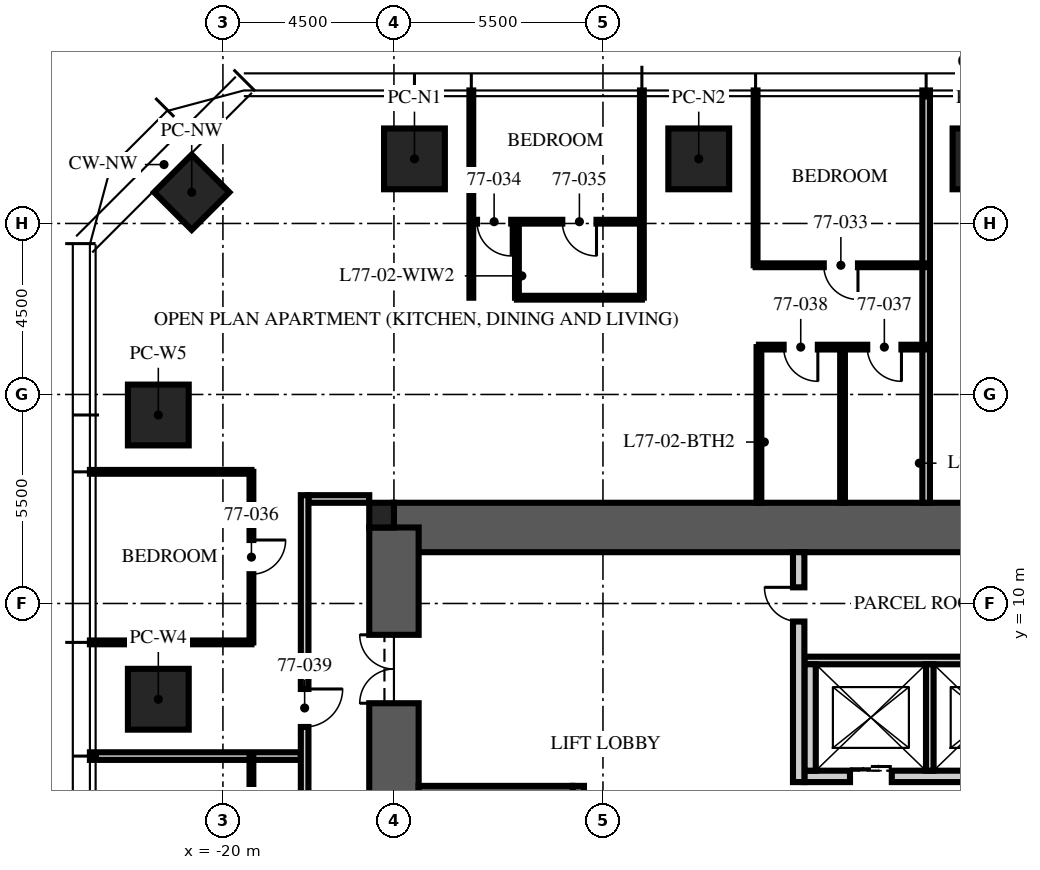
"""IFC4 building model, lengths in metres.
Left out: names, types, materials, properties, quantities, classifications, styles, units other than length and angle.
Written with IfcOpenShell. Run it as: python <this file> out.ifc"""

import sys

from ifc_helpers import new_model, si_unit, direction, frame, frame_2d, origin, origin_2d, place, context, subcontext, project, spatial, rectangle, extrude, element, fill, save


model = new_model("IFC4")
c1 = context("Model", 3, precision=1e-05, world=origin(), true_north=direction((0.0, 1.0)))
c2 = subcontext(c1, "Body", "Model", "MODEL_VIEW")
j1 = project(units=[si_unit("LENGTHUNIT", "METRE"), si_unit("PLANEANGLEUNIT", "RADIAN")], contexts=[c1])
p1 = place(None, origin())
s1 = spatial("IfcSite", under=j1, at=p1, CompositionType="ELEMENT")
p2 = place(p1, origin())
s2 = spatial("IfcBuilding", under=s1, at=p2, CompositionType="ELEMENT")
p3 = place(p2, frame((0.0, 0.0, 308.25)))
s3 = spatial("IfcBuildingStorey", under=s2, at=p3, CompositionType="ELEMENT", Elevation=308.25)
p4 = place(p3, frame((-15.5, 12.0, -0.25), z_axis=(0.0, 0.0, 1.0), x_axis=(1.0, 0.0, 0.0)))
e1 = element("IfcWall", 1, at=p4, inside=s3, PredefinedType="SHEAR", context=c2, shape_type="SweptSolid", body=[
    extrude(rectangle(XDim=31.0, YDim=1.3, at=frame_2d((15.5, 0.0))), origin(), (0.0, 0.0, 1.0), 3.75),
])
p5 = place(p3, frame((-15.5, -12.0, -0.25), z_axis=(0.0, 0.0, 1.0), x_axis=(0.0, 1.0, 0.0)))
e2 = element("IfcWall", 2, at=p5, inside=s3, PredefinedType="SHEAR", context=c2, shape_type="SweptSolid", body=[
    extrude(rectangle(XDim=24.0, YDim=1.3, at=frame_2d((12.0, 0.0))), origin(), (0.0, 0.0, 1.0), 3.75),
])
p6 = place(p5, frame((3.125, 0.0, 0.25)))
e3 = element("IfcOpeningElement", 3, at=p6, cuts=e2, PredefinedType="OPENING", context=c2, shape_type="SweptSolid", body=[
    extrude(rectangle(XDim=1.2, YDim=2.1, at=frame_2d((0.6, 1.05))), frame((0.0, 0.66, 0.0), z_axis=(0.0, -1.0, 0.0), x_axis=(1.0, 0.0, 0.0)), (0.0, 0.0, 1.0), 1.32),
])
p7 = place(p5, frame((19.375, 0.0, 0.25)))
e4 = element("IfcOpeningElement", 4, at=p7, cuts=e2, PredefinedType="OPENING", context=c2, shape_type="SweptSolid", body=[
    extrude(rectangle(XDim=1.8, YDim=2.1, at=frame_2d((0.9, 1.05))), frame((0.0, 0.66, 0.0), z_axis=(0.0, -1.0, 0.0), x_axis=(1.0, 0.0, 0.0)), (0.0, 0.0, 1.0), 1.32),
])
p8 = place(p3, frame((-15.825, 12.325, -0.25), z_axis=(0.0, 0.0, 1.0), x_axis=(1.0, 0.0, 0.0)))
e5 = element("IfcColumn", 5, at=p8, inside=s3, PredefinedType="COLUMN", context=c2, shape_type="SweptSolid", body=[
    extrude(rectangle(XDim=0.65, YDim=0.65, at=origin_2d()), origin(), (0.0, 0.0, 1.0), 3.75),
])
for number, where, z_axis, x_axis in (
    (6, (-14.96, 21.7, 0.0), (0.0, 0.0, 1.0), (1.0, 0.0, 0.0)),
    (7, (-7.48, 21.7, 0.0), (0.0, 0.0, 1.0), (1.0, 0.0, 0.0)),
    (8, (0.0, 21.7, 0.0), (0.0, 0.0, 1.0), (1.0, 0.0, 0.0)),
    (9, (-21.7, 7.48, 0.0), (0.0, 0.0, 1.0), (0.0, 1.0, 0.0)),
    (10, (-21.7, 14.96, 0.0), (0.0, 0.0, 1.0), (0.0, 1.0, 0.0)),
):
    element("IfcColumn", number, at=place(p3, frame(where, z_axis=z_axis, x_axis=x_axis)), inside=s3, PredefinedType="COLUMN", context=c2, shape_type="SweptSolid", body=[
        extrude(rectangle(XDim=1.6, YDim=1.6, at=origin_2d()), origin(), (0.0, 0.0, 1.0), 3.75),
    ])
p9 = place(p3, frame((-20.821, 20.821, 0.0), z_axis=(0.0, 0.0, 1.0), x_axis=(0.707106781187, 0.707106781187, 0.0)))
e11 = element("IfcColumn", 11, at=p9, inside=s3, PredefinedType="COLUMN", context=c2, shape_type="SweptSolid", body=[
    extrude(rectangle(XDim=1.4, YDim=1.4, at=origin_2d()), origin(), (0.0, 0.0, 1.0), 3.75),
])
p10 = place(p3, frame((-10.65, -4.9, 0.0), z_axis=(0.0, 0.0, 1.0), x_axis=(0.0, 1.0, 0.0)))
e12 = element("IfcWall", 12, at=p10, inside=s3, PredefinedType="SOLIDWALL", context=c2, shape_type="SweptSolid", body=[
    extrude(rectangle(XDim=10.1, YDim=0.3, at=frame_2d((5.05, 0.0))), origin(), (0.0, 0.0, 1.0), 3.5),
])
p11 = place(p3, frame((-14.85, 5.05, 0.0), z_axis=(0.0, 0.0, 1.0), x_axis=(1.0, 0.0, 0.0)))
e13 = element("IfcWall", 13, at=p11, inside=s3, PredefinedType="SOLIDWALL", context=c2, shape_type="SweptSolid", body=[
    extrude(rectangle(XDim=4.05, YDim=0.3, at=frame_2d((2.025, 0.0))), origin(), (0.0, 0.0, 1.0), 3.5),
])
p12 = place(p3, frame((-4.7, 5.45, 0.0), z_axis=(0.0, 0.0, 1.0), x_axis=(1.0, 0.0, 0.0)))
e14 = element("IfcWall", 14, at=p12, inside=s3, PredefinedType="PARTITIONING", context=c2, shape_type="SweptSolid", body=[
    extrude(rectangle(XDim=9.7, YDim=0.3, at=frame_2d((4.85, 0.0))), origin(), (0.0, 0.0, 1.0), 3.5),
])
p13 = place(p12, frame((1.2, 0.0, 0.0)))
e15 = element("IfcOpeningElement", 15, at=p13, cuts=e14, PredefinedType="OPENING", context=c2, shape_type="SweptSolid", body=[
    extrude(rectangle(XDim=1.1, YDim=2.1, at=frame_2d((0.55, 1.05))), frame((0.0, 0.16, 0.0), z_axis=(0.0, -1.0, 0.0), x_axis=(1.0, 0.0, 0.0)), (0.0, 0.0, 1.0), 0.32),
])
p14 = place(p12, frame((4.3, 0.0, 0.0)))
e16 = element("IfcOpeningElement", 16, at=p14, cuts=e14, PredefinedType="OPENING", context=c2, shape_type="SweptSolid", body=[
    extrude(rectangle(XDim=1.1, YDim=2.1, at=frame_2d((0.55, 1.05))), frame((0.0, 0.16, 0.0), z_axis=(0.0, -1.0, 0.0), x_axis=(1.0, 0.0, 0.0)), (0.0, 0.0, 1.0), 0.32),
])
p15 = place(p12, frame((7.4, 0.0, 0.0)))
e17 = element("IfcOpeningElement", 17, at=p15, cuts=e14, PredefinedType="OPENING", context=c2, shape_type="SweptSolid", body=[
    extrude(rectangle(XDim=1.1, YDim=2.1, at=frame_2d((0.55, 1.05))), frame((0.0, 0.16, 0.0), z_axis=(0.0, -1.0, 0.0), x_axis=(1.0, 0.0, 0.0)), (0.0, 0.0, 1.0), 0.32),
])
p16 = place(p3, frame((-4.7, 8.5, 0.0), z_axis=(0.0, 0.0, 1.0), x_axis=(1.0, 0.0, 0.0)))
e18 = element("IfcWall", 18, at=p16, inside=s3, PredefinedType="PARTITIONING", context=c2, shape_type="SweptSolid", body=[
    extrude(rectangle(XDim=9.7, YDim=0.2, at=frame_2d((4.85, 0.0))), origin(), (0.0, 0.0, 1.0), 3.5),
])
p17 = place(p3, frame((-4.55, 5.6, 0.0), z_axis=(0.0, 0.0, 1.0), x_axis=(0.0, 1.0, 0.0)))
e19 = element("IfcWall", 19, at=p17, inside=s3, PredefinedType="PARTITIONING", context=c2, shape_type="SweptSolid", body=[
    extrude(rectangle(XDim=2.8, YDim=0.3, at=frame_2d((1.4, 0.0))), origin(), (0.0, 0.0, 1.0), 3.5),
])
p18 = place(p3, frame((-1.4, 5.6, 0.0), z_axis=(0.0, 0.0, 1.0), x_axis=(0.0, 1.0, 0.0)))
e20 = element("IfcWall", 20, at=p18, inside=s3, PredefinedType="PARTITIONING", context=c2, shape_type="SweptSolid", body=[
    extrude(rectangle(XDim=2.8, YDim=0.2, at=frame_2d((1.4, 0.0))), origin(), (0.0, 0.0, 1.0), 3.5),
])
p19 = place(p3, frame((-4.85, 5.3, 0.0), z_axis=(0.0, 0.0, 1.0), x_axis=(0.0, 1.0, 0.0)))
e21 = element("IfcWall", 21, at=p19, inside=s3, PredefinedType="PARTITIONING", context=c2, shape_type="SweptSolid", body=[
    extrude(rectangle(XDim=6.05, YDim=0.3, at=frame_2d((3.025, 0.0))), origin(), (0.0, 0.0, 1.0), 3.5),
])
p20 = place(p19, frame((4.225, 0.0, 0.0)))
e22 = element("IfcOpeningElement", 22, at=p20, cuts=e21, PredefinedType="OPENING", context=c2, shape_type="SweptSolid", body=[
    extrude(rectangle(XDim=0.9, YDim=2.1, at=frame_2d((0.45, 1.05))), frame((0.0, 0.16, 0.0), z_axis=(0.0, -1.0, 0.0), x_axis=(1.0, 0.0, 0.0)), (0.0, 0.0, 1.0), 0.32),
])
p21 = place(p3, frame((-16.15, 12.75, 0.0), z_axis=(0.0, 0.0, 1.0), x_axis=(-1.0, 0.0, 0.0)))
e23 = element("IfcWall", 23, at=p21, inside=s3, PredefinedType="PARTITIONING", context=c2, shape_type="SweptSolid", body=[
    extrude(rectangle(XDim=1.6, YDim=0.2, at=frame_2d((0.8, 0.0))), origin(), (0.0, 0.0, 1.0), 2.6),
])
p22 = place(p3, frame((-1.496, 12.65, 0.0), z_axis=(0.0, 0.0, 1.0), x_axis=(0.0, 1.0, 0.0)))
e24 = element("IfcWall", 24, at=p22, inside=s3, PredefinedType="PARTITIONING", context=c2, shape_type="SweptSolid", body=[
    extrude(rectangle(XDim=10.85, YDim=0.2, at=frame_2d((5.425, 0.0))), origin(), (0.0, 0.0, 1.0), 3.01),
])
p23 = place(p3, frame((-5.984, 18.9, 0.0), z_axis=(0.0, 0.0, 1.0), x_axis=(0.0, 1.0, 0.0)))
e25 = element("IfcWall", 25, at=p23, inside=s3, PredefinedType="PARTITIONING", context=c2, shape_type="SweptSolid", body=[
    extrude(rectangle(XDim=4.6, YDim=0.1, at=frame_2d((2.3, 0.0))), origin(), (0.0, 0.0, 1.0), 3.01),
])
for number, where, z_axis, x_axis in (
    (26, (-8.976, 18.046, 0.0), (0.0, 0.0, 1.0), (0.0, 1.0, 0.0)),
    (27, (-13.464, 18.046, 0.0), (0.0, 0.0, 1.0), (0.0, 1.0, 0.0)),
):
    element("IfcWall", number, at=place(p3, frame(where, z_axis=z_axis, x_axis=x_axis)), inside=s3, PredefinedType="PARTITIONING", context=c2, shape_type="SweptSolid", body=[
        extrude(rectangle(XDim=5.454, YDim=0.1, at=frame_2d((2.727, 0.0))), origin(), (0.0, 0.0, 1.0), 3.01),
    ])
for number, where, z_axis, x_axis in (
    (28, (-19.25, 13.464, 0.0), (0.0, 0.0, 1.0), (-1.0, 0.0, 0.0)),
    (29, (-19.25, 8.976, 0.0), (0.0, 0.0, 1.0), (-1.0, 0.0, 0.0)),
):
    element("IfcWall", number, at=place(p3, frame(where, z_axis=z_axis, x_axis=x_axis)), inside=s3, PredefinedType="PARTITIONING", context=c2, shape_type="SweptSolid", body=[
        extrude(rectangle(XDim=4.25, YDim=0.1, at=frame_2d((2.125, 0.0))), origin(), (0.0, 0.0, 1.0), 3.01),
    ])
p24 = place(p3, frame((-17.95, 5.984, 0.0), z_axis=(0.0, 0.0, 1.0), x_axis=(-1.0, 0.0, 0.0)))
e30 = element("IfcWall", 30, at=p24, inside=s3, PredefinedType="PARTITIONING", context=c2, shape_type="SweptSolid", body=[
    extrude(rectangle(XDim=5.55, YDim=0.2, at=frame_2d((2.775, 0.0))), origin(), (0.0, 0.0, 1.0), 3.01),
])
p25 = place(p3, frame((-1.496, 18.9, 0.0), z_axis=(0.0, 0.0, 1.0), x_axis=(-1.0, 0.0, 0.0)))
e31 = element("IfcWall", 31, at=p25, inside=s3, PredefinedType="PARTITIONING", context=c2, shape_type="SweptSolid", body=[
    extrude(rectangle(XDim=4.488, YDim=0.1, at=frame_2d((2.244, 0.0))), origin(), (0.0, 0.0, 1.0), 2.91),
])
p26 = place(p25, frame((1.794, 0.0, 0.0)))
e32 = element("IfcOpeningElement", 32, at=p26, cuts=e31, PredefinedType="OPENING", context=c2, shape_type="SweptSolid", body=[
    extrude(rectangle(XDim=0.9, YDim=2.1, at=frame_2d((0.45, 1.05))), frame((0.0, 0.06, 0.0), z_axis=(0.0, -1.0, 0.0), x_axis=(1.0, 0.0, 0.0)), (0.0, 0.0, 1.0), 0.12),
])
p27 = place(p3, frame((-8.976, 20.046, 0.0), z_axis=(0.0, 0.0, 1.0), x_axis=(-1.0, 0.0, 0.0)))
e33 = element("IfcWall", 33, at=p27, inside=s3, PredefinedType="PARTITIONING", context=c2, shape_type="SweptSolid", body=[
    extrude(rectangle(XDim=4.488, YDim=0.1, at=frame_2d((2.244, 0.0))), origin(), (0.0, 0.0, 1.0), 2.91),
])
p28 = place(p27, frame((3.438, 0.0, 0.0)))
e34 = element("IfcOpeningElement", 34, at=p28, cuts=e33, PredefinedType="OPENING", context=c2, shape_type="SweptSolid", body=[
    extrude(rectangle(XDim=0.9, YDim=2.1, at=frame_2d((0.45, 1.05))), frame((0.0, 0.06, 0.0), z_axis=(0.0, -1.0, 0.0), x_axis=(1.0, 0.0, 0.0)), (0.0, 0.0, 1.0), 0.12),
])
p29 = place(p27, frame((1.194, 0.0, 0.0)))
e35 = element("IfcOpeningElement", 35, at=p29, cuts=e33, PredefinedType="OPENING", context=c2, shape_type="SweptSolid", body=[
    extrude(rectangle(XDim=0.9, YDim=2.1, at=frame_2d((0.45, 1.05))), frame((0.0, 0.06, 0.0), z_axis=(0.0, -1.0, 0.0), x_axis=(1.0, 0.0, 0.0)), (0.0, 0.0, 1.0), 0.12),
])
p30 = place(p3, frame((-12.264, 18.046, 0.0), z_axis=(0.0, 0.0, 1.0), x_axis=(0.0, 1.0, 0.0)))
e36 = element("IfcWall", 36, at=p30, inside=s3, PredefinedType="PARTITIONING", context=c2, shape_type="SweptSolid", body=[
    extrude(rectangle(XDim=2.0, YDim=0.1, at=frame_2d((1.0, 0.0))), origin(), (0.0, 0.0, 1.0), 3.5),
])
p31 = place(p3, frame((-8.976, 18.046, 0.0), z_axis=(0.0, 0.0, 1.0), x_axis=(-1.0, 0.0, 0.0)))
e37 = element("IfcWall", 37, at=p31, inside=s3, PredefinedType="PARTITIONING", context=c2, shape_type="SweptSolid", body=[
    extrude(rectangle(XDim=3.288, YDim=0.1, at=frame_2d((1.644, 0.0))), origin(), (0.0, 0.0, 1.0), 2.91),
])
p32 = place(p3, frame((-19.25, 13.464, 0.0), z_axis=(0.0, 0.0, 1.0), x_axis=(0.0, -1.0, 0.0)))
e38 = element("IfcWall", 38, at=p32, inside=s3, PredefinedType="PARTITIONING", context=c2, shape_type="SweptSolid", body=[
    extrude(rectangle(XDim=4.488, YDim=0.1, at=frame_2d((2.244, 0.0))), origin(), (0.0, 0.0, 1.0), 2.91),
])
p33 = place(p32, frame((1.794, 0.0, 0.0)))
e39 = element("IfcOpeningElement", 39, at=p33, cuts=e38, PredefinedType="OPENING", context=c2, shape_type="SweptSolid", body=[
    extrude(rectangle(XDim=0.9, YDim=2.1, at=frame_2d((0.45, 1.05))), frame((0.0, 0.06, 0.0), z_axis=(0.0, -1.0, 0.0), x_axis=(1.0, 0.0, 0.0)), (0.0, 0.0, 1.0), 0.12),
])
p34 = place(p3, frame((-1.496, 16.746, 0.0), z_axis=(0.0, 0.0, 1.0), x_axis=(-1.0, 0.0, 0.0)))
e40 = element("IfcWall", 40, at=p34, inside=s3, PredefinedType="PARTITIONING", context=c2, shape_type="SweptSolid", body=[
    extrude(rectangle(XDim=4.4, YDim=0.125, at=frame_2d((2.2, 0.0))), origin(), (0.0, 0.0, 1.0), 2.91),
])
p35 = place(p34, frame((0.65, 0.0, 0.0)))
e41 = element("IfcOpeningElement", 41, at=p35, cuts=e40, PredefinedType="OPENING", context=c2, shape_type="SweptSolid", body=[
    extrude(rectangle(XDim=0.9, YDim=2.1, at=frame_2d((0.45, 1.05))), frame((0.0, 0.073, 0.0), z_axis=(0.0, -1.0, 0.0), x_axis=(1.0, 0.0, 0.0)), (0.0, 0.0, 1.0), 0.145),
])
p36 = place(p34, frame((2.85, 0.0, 0.0)))
e42 = element("IfcOpeningElement", 42, at=p36, cuts=e40, PredefinedType="OPENING", context=c2, shape_type="SweptSolid", body=[
    extrude(rectangle(XDim=0.9, YDim=2.1, at=frame_2d((0.45, 1.05))), frame((0.0, 0.073, 0.0), z_axis=(0.0, -1.0, 0.0), x_axis=(1.0, 0.0, 0.0)), (0.0, 0.0, 1.0), 0.145),
])
p37 = place(p3, frame((-3.696, 12.65, 0.0), z_axis=(0.0, 0.0, 1.0), x_axis=(0.0, 1.0, 0.0)))
e43 = element("IfcWall", 43, at=p37, inside=s3, PredefinedType="PARTITIONING", context=c2, shape_type="SweptSolid", body=[
    extrude(rectangle(XDim=4.096, YDim=0.125, at=frame_2d((2.048, 0.0))), origin(), (0.0, 0.0, 1.0), 2.91),
])
p38 = place(p3, frame((-5.896, 12.65, 0.0), z_axis=(0.0, 0.0, 1.0), x_axis=(0.0, 1.0, 0.0)))
e44 = element("IfcWall", 44, at=p38, inside=s3, PredefinedType="PARTITIONING", context=c2, shape_type="SweptSolid", body=[
    extrude(rectangle(XDim=4.096, YDim=0.125, at=frame_2d((2.048, 0.0))), origin(), (0.0, 0.0, 1.0), 3.5),
])
p39 = place(p3, frame((-19.25, 5.984, 0.0), z_axis=(0.0, 0.0, 1.0), x_axis=(0.0, -1.0, 0.0)))
e45 = element("IfcWall", 45, at=p39, inside=s3, PredefinedType="PARTITIONING", context=c2, shape_type="SweptSolid", body=[
    extrude(rectangle(XDim=4.488, YDim=0.1, at=frame_2d((2.244, 0.0))), origin(), (0.0, 0.0, 1.0), 2.91),
])
p40 = place(p39, frame((1.794, 0.0, 0.0)))
e46 = element("IfcOpeningElement", 46, at=p40, cuts=e45, PredefinedType="OPENING", context=c2, shape_type="SweptSolid", body=[
    extrude(rectangle(XDim=0.9, YDim=2.1, at=frame_2d((0.45, 1.05))), frame((0.0, 0.06, 0.0), z_axis=(0.0, -1.0, 0.0), x_axis=(1.0, 0.0, 0.0)), (0.0, 0.0, 1.0), 0.12),
])
p41 = place(p3, frame((-17.85, 12.85, 0.0), z_axis=(0.0, 0.0, 1.0), x_axis=(0.0, -1.0, 0.0)))
e47 = element("IfcWall", 47, at=p41, inside=s3, PredefinedType="PARTITIONING", context=c2, shape_type="SweptSolid", body=[
    extrude(rectangle(XDim=25.5, YDim=0.2, at=frame_2d((12.75, 0.0))), origin(), (0.0, 0.0, 1.0), 2.9),
])
p42 = place(p41, frame((5.1, 0.0, 0.0)))
e48 = element("IfcOpeningElement", 48, at=p42, cuts=e47, PredefinedType="OPENING", context=c2, shape_type="SweptSolid", body=[
    extrude(rectangle(XDim=1.0, YDim=2.2, at=frame_2d((0.5, 1.1))), frame((0.0, 0.11, 0.0), z_axis=(0.0, -1.0, 0.0), x_axis=(1.0, 0.0, 0.0)), (0.0, 0.0, 1.0), 0.22),
])
p43 = place(p41, frame((23.386, 0.0, 0.0)))
e49 = element("IfcOpeningElement", 49, at=p43, cuts=e47, PredefinedType="OPENING", context=c2, shape_type="SweptSolid", body=[
    extrude(rectangle(XDim=1.0, YDim=2.2, at=frame_2d((0.5, 1.1))), frame((0.0, 0.11, 0.0), z_axis=(0.0, -1.0, 0.0), x_axis=(1.0, 0.0, 0.0)), (0.0, 0.0, 1.0), 0.22),
])
p44 = place(p7, origin())
e50 = element("IfcDoor", 50, at=p44, inside=s3, OperationType="DOUBLE_DOOR_SINGLE_SWING", PredefinedType="DOOR", context=c2, shape_type="SweptSolid", body=[
    extrude(rectangle(XDim=1.8, YDim=2.1, at=frame_2d((0.9, 1.05))), frame((0.0, 0.025, 0.0), z_axis=(0.0, -1.0, 0.0), x_axis=(1.0, 0.0, 0.0)), (0.0, 0.0, 1.0), 0.05),
])
fill(e4, e50)
p45 = place(p13, origin())
e51 = element("IfcDoor", 51, at=p45, inside=s3, OperationType="DOUBLE_DOOR_SLIDING", PredefinedType="DOOR", context=c2, shape_type="SweptSolid", body=[
    extrude(rectangle(XDim=1.1, YDim=2.1, at=frame_2d((0.55, 1.05))), frame((0.0, 0.025, 0.0), z_axis=(0.0, -1.0, 0.0), x_axis=(1.0, 0.0, 0.0)), (0.0, 0.0, 1.0), 0.05),
])
fill(e15, e51)
p46 = place(p20, origin())
e52 = element("IfcDoor", 52, at=p46, inside=s3, OperationType="SINGLE_SWING_RIGHT", PredefinedType="DOOR", context=c2, shape_type="SweptSolid", body=[
    extrude(rectangle(XDim=0.9, YDim=2.1, at=frame_2d((0.45, 1.05))), frame((0.0, 0.025, 0.0), z_axis=(0.0, -1.0, 0.0), x_axis=(1.0, 0.0, 0.0)), (0.0, 0.0, 1.0), 0.05),
])
fill(e22, e52)
p47 = place(p26, origin())
e53 = element("IfcDoor", 53, at=p47, inside=s3, OperationType="SINGLE_SWING_LEFT", PredefinedType="DOOR", context=c2, shape_type="SweptSolid", body=[
    extrude(rectangle(XDim=0.9, YDim=2.1, at=frame_2d((0.45, 1.05))), frame((0.0, 0.025, 0.0), z_axis=(0.0, -1.0, 0.0), x_axis=(1.0, 0.0, 0.0)), (0.0, 0.0, 1.0), 0.05),
])
fill(e32, e53)
p48 = place(p28, origin())
e54 = element("IfcDoor", 54, at=p48, inside=s3, OperationType="SINGLE_SWING_LEFT", PredefinedType="DOOR", context=c2, shape_type="SweptSolid", body=[
    extrude(rectangle(XDim=0.9, YDim=2.1, at=frame_2d((0.45, 1.05))), frame((0.0, 0.025, 0.0), z_axis=(0.0, -1.0, 0.0), x_axis=(1.0, 0.0, 0.0)), (0.0, 0.0, 1.0), 0.05),
])
fill(e34, e54)
p49 = place(p29, origin())
e55 = element("IfcDoor", 55, at=p49, inside=s3, OperationType="SINGLE_SWING_LEFT", PredefinedType="DOOR", context=c2, shape_type="SweptSolid", body=[
    extrude(rectangle(XDim=0.9, YDim=2.1, at=frame_2d((0.45, 1.05))), frame((0.0, 0.025, 0.0), z_axis=(0.0, -1.0, 0.0), x_axis=(1.0, 0.0, 0.0)), (0.0, 0.0, 1.0), 0.05),
])
fill(e35, e55)
p50 = place(p33, origin())
e56 = element("IfcDoor", 56, at=p50, inside=s3, OperationType="SINGLE_SWING_LEFT", PredefinedType="DOOR", context=c2, shape_type="SweptSolid", body=[
    extrude(rectangle(XDim=0.9, YDim=2.1, at=frame_2d((0.45, 1.05))), frame((0.0, 0.025, 0.0), z_axis=(0.0, -1.0, 0.0), x_axis=(1.0, 0.0, 0.0)), (0.0, 0.0, 1.0), 0.05),
])
fill(e39, e56)
p51 = place(p35, origin())
e57 = element("IfcDoor", 57, at=p51, inside=s3, OperationType="SINGLE_SWING_LEFT", PredefinedType="DOOR", context=c2, shape_type="SweptSolid", body=[
    extrude(rectangle(XDim=0.9, YDim=2.1, at=frame_2d((0.45, 1.05))), frame((0.0, 0.025, 0.0), z_axis=(0.0, -1.0, 0.0), x_axis=(1.0, 0.0, 0.0)), (0.0, 0.0, 1.0), 0.05),
])
fill(e41, e57)
p52 = place(p36, origin())
e58 = element("IfcDoor", 58, at=p52, inside=s3, OperationType="SINGLE_SWING_LEFT", PredefinedType="DOOR", context=c2, shape_type="SweptSolid", body=[
    extrude(rectangle(XDim=0.9, YDim=2.1, at=frame_2d((0.45, 1.05))), frame((0.0, 0.025, 0.0), z_axis=(0.0, -1.0, 0.0), x_axis=(1.0, 0.0, 0.0)), (0.0, 0.0, 1.0), 0.05),
])
fill(e42, e58)
p53 = place(p42, origin())
e59 = element("IfcDoor", 59, at=p53, inside=s3, OperationType="SINGLE_SWING_LEFT", PredefinedType="DOOR", context=c2, shape_type="SweptSolid", body=[
    extrude(rectangle(XDim=1.0, YDim=2.2, at=frame_2d((0.5, 1.1))), frame((0.0, 0.025, 0.0), z_axis=(0.0, -1.0, 0.0), x_axis=(1.0, 0.0, 0.0)), (0.0, 0.0, 1.0), 0.05),
])
fill(e48, e59)
save(model, sys.argv[1])
